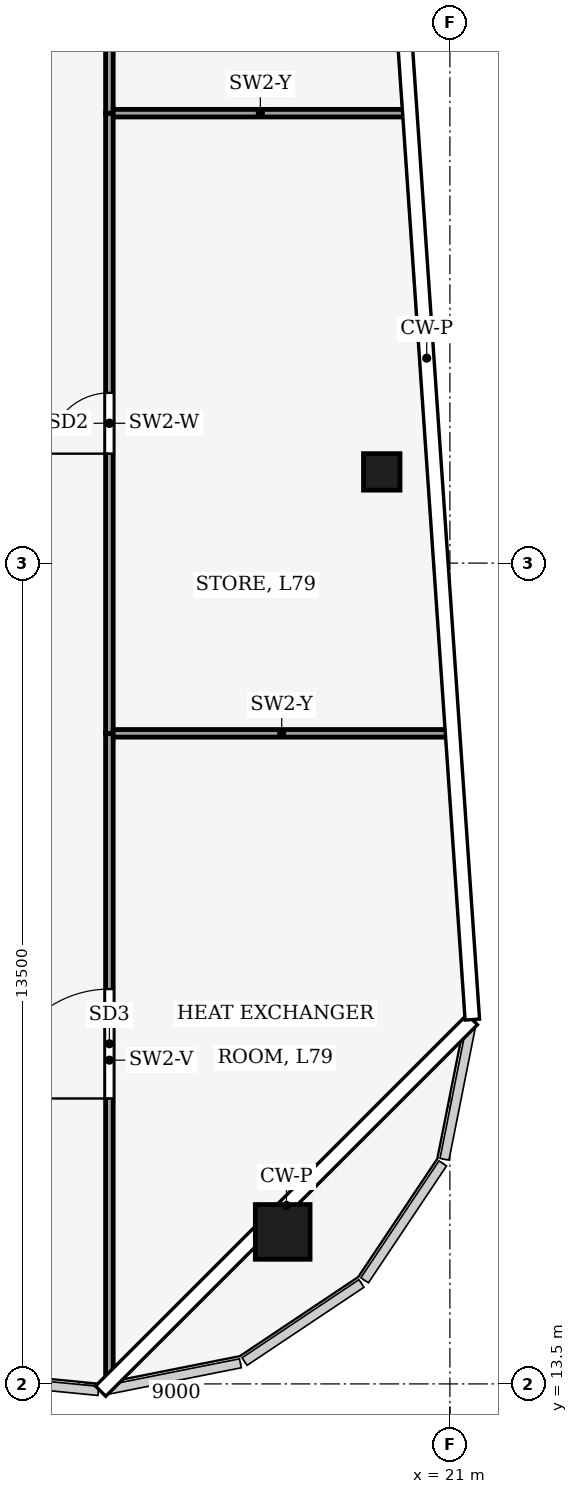
"""IFC4 building model, lengths in metres.
Left out: names, types, materials, properties, quantities, classifications, styles, units other than length and angle.
Written with IfcOpenShell. Run it as: python <this file> out.ifc"""

import sys

from ifc_helpers import new_model, si_unit, direction, frame, frame_2d, origin, origin_2d, place, context, subcontext, project, spatial, rectangle, hollow_rectangle, extrude, element, fill, save


model = new_model("IFC4")
c1 = context("Model", 3, precision=1e-05, world=origin(), true_north=direction((0.0, 1.0)))
c2 = subcontext(c1, "Body", "Model", "MODEL_VIEW")
j1 = project(units=[si_unit("LENGTHUNIT", "METRE"), si_unit("PLANEANGLEUNIT", "RADIAN")], contexts=[c1])
p1 = place(None, origin())
s1 = spatial("IfcSite", under=j1, at=p1, CompositionType="ELEMENT")
p2 = place(p1, origin())
s2 = spatial("IfcBuilding", under=s1, at=p2, CompositionType="ELEMENT")
p3 = place(p2, frame((0.0, 0.0, 349.5)))
s3 = spatial("IfcBuildingStorey", under=s2, at=p3, CompositionType="ELEMENT", Elevation=349.5)
p4 = place(p3, frame((18.25, 16.0, 0.0), z_axis=(0.0, 0.0, 1.0), x_axis=(1.0, 0.0, 0.0)))
e1 = element("IfcColumn", 1, at=p4, inside=s3, PredefinedType="COLUMN", context=c2, shape_type="SweptSolid", body=[
    extrude(hollow_rectangle(XDim=0.9, YDim=0.9, WallThickness=0.04, at=origin_2d()), origin(), (0.0, 0.0, 1.0), 5.0),
])
p5 = place(p3, frame((19.879, 28.5, 0.0), z_axis=(0.0, 0.0, 1.0), x_axis=(1.0, 0.0, 0.0)))
e2 = element("IfcColumn", 2, at=p5, inside=s3, PredefinedType="COLUMN", context=c2, shape_type="SweptSolid", body=[
    extrude(hollow_rectangle(XDim=0.6, YDim=0.6, WallThickness=0.025, at=origin_2d()), origin(), (0.0, 0.0, 1.0), 5.0),
])
p6 = place(p3, frame((15.4, 13.45, 0.0), z_axis=(0.0, 0.0, 1.0), x_axis=(0.0, 1.0, 0.0)))
e3 = element("IfcWall", 3, at=p6, inside=s3, PredefinedType="PARTITIONING", context=c2, shape_type="SweptSolid", body=[
    extrude(rectangle(XDim=10.75, YDim=0.125, at=frame_2d((5.375, 0.0))), origin(), (0.0, 0.0, 1.0), 3.812),
])
p7 = place(p6, frame((4.745, 0.0, 0.0)))
e4 = element("IfcOpeningElement", 4, at=p7, cuts=e3, PredefinedType="OPENING", context=c2, shape_type="SweptSolid", body=[
    extrude(rectangle(XDim=1.8, YDim=2.4, at=frame_2d((0.9, 1.2))), frame((0.0, 0.073, 0.0), z_axis=(0.0, -1.0, 0.0), x_axis=(1.0, 0.0, 0.0)), (0.0, 0.0, 1.0), 0.145),
])
p8 = place(p3, frame((15.4, 24.2, 0.0), z_axis=(0.0, 0.0, 1.0), x_axis=(0.0, 1.0, 0.0)))
e5 = element("IfcWall", 5, at=p8, inside=s3, PredefinedType="PARTITIONING", context=c2, shape_type="SweptSolid", body=[
    extrude(rectangle(XDim=10.2, YDim=0.125, at=frame_2d((5.1, 0.0))), origin(), (0.0, 0.0, 1.0), 4.52),
])
p9 = place(p8, frame((4.6, 0.0, 0.0)))
e6 = element("IfcOpeningElement", 6, at=p9, cuts=e5, PredefinedType="OPENING", context=c2, shape_type="SweptSolid", body=[
    extrude(rectangle(XDim=1.0, YDim=2.1, at=frame_2d((0.5, 1.05))), frame((0.0, 0.073, 0.0), z_axis=(0.0, -1.0, 0.0), x_axis=(1.0, 0.0, 0.0)), (0.0, 0.0, 1.0), 0.145),
])
p10 = place(p3, frame((15.4, 34.4, 0.0), z_axis=(0.0, 0.0, 1.0), x_axis=(0.0, 1.0, 0.0)))
e7 = element("IfcWall", 7, at=p10, inside=s3, PredefinedType="PARTITIONING", context=c2, shape_type="SweptSolid", body=[
    extrude(rectangle(XDim=10.2, YDim=0.125, at=frame_2d((5.1, 0.0))), origin(), (0.0, 0.0, 1.0), 4.12),
])
p11 = place(p10, frame((4.2, 0.0, 0.0)))
e8 = element("IfcOpeningElement", 8, at=p11, cuts=e7, PredefinedType="OPENING", context=c2, shape_type="SweptSolid", body=[
    extrude(rectangle(XDim=1.8, YDim=2.4, at=frame_2d((0.9, 1.2))), frame((0.0, 0.073, 0.0), z_axis=(0.0, -1.0, 0.0), x_axis=(1.0, 0.0, 0.0)), (0.0, 0.0, 1.0), 0.145),
])
p12 = place(p3, frame((15.462, 24.2, 0.0), z_axis=(0.0, 0.0, 1.0), x_axis=(1.0, 0.0, 0.0)))
e9 = element("IfcWall", 9, at=p12, inside=s3, PredefinedType="PARTITIONING", context=c2, shape_type="SweptSolid", body=[
    extrude(rectangle(XDim=5.543, YDim=0.125, at=frame_2d((2.772, 0.0))), origin(), (0.0, 0.0, 1.0), 4.02),
])
p13 = place(p3, frame((15.462, 34.4, 0.0), z_axis=(0.0, 0.0, 1.0), x_axis=(1.0, 0.0, 0.0)))
e10 = element("IfcWall", 10, at=p13, inside=s3, PredefinedType="PARTITIONING", context=c2, shape_type="SweptSolid", body=[
    extrude(rectangle(XDim=4.84, YDim=0.125, at=frame_2d((2.42, 0.0))), origin(), (0.0, 0.0, 1.0), 4.02),
])
p14 = place(p7, origin())
e11 = element("IfcDoor", 11, at=p14, inside=s3, OperationType="DOUBLE_DOOR_SINGLE_SWING", PredefinedType="DOOR", context=c2, shape_type="SweptSolid", body=[
    extrude(rectangle(XDim=1.8, YDim=2.4, at=frame_2d((0.9, 1.2))), frame((0.0, 0.025, 0.0), z_axis=(0.0, -1.0, 0.0), x_axis=(1.0, 0.0, 0.0)), (0.0, 0.0, 1.0), 0.05),
])
fill(e4, e11)
p15 = place(p9, origin())
e12 = element("IfcDoor", 12, at=p15, inside=s3, OperationType="SINGLE_SWING_LEFT", PredefinedType="DOOR", context=c2, shape_type="SweptSolid", body=[
    extrude(rectangle(XDim=1.0, YDim=2.1, at=frame_2d((0.5, 1.05))), frame((0.0, 0.025, 0.0), z_axis=(0.0, -1.0, 0.0), x_axis=(1.0, 0.0, 0.0)), (0.0, 0.0, 1.0), 0.05),
])
fill(e6, e12)
save(model, sys.argv[1])
